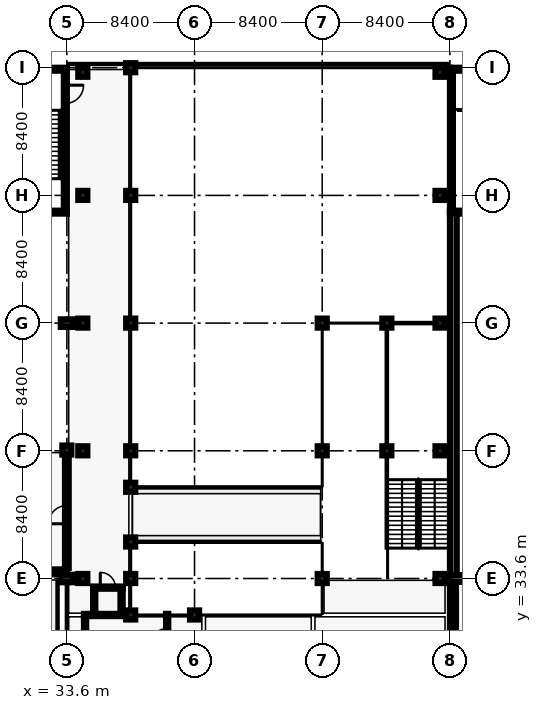
"""IFC4 building model, lengths in metres.
Left out: names, types, materials, properties, quantities, classifications, styles, units other than length and angle.
Written with IfcOpenShell. Run it as: python <this file> out.ifc"""

import sys

from ifc_helpers import new_model, si_unit, direction, frame, frame_2d, origin, origin_2d, place, context, subcontext, project, spatial, rectangle, extrude, element, fill, save


model = new_model("IFC4")
c1 = context("Model", 3, precision=1e-05, world=origin(), true_north=direction((0.0, 1.0)))
c2 = subcontext(c1, "Body", "Model", "MODEL_VIEW")
j1 = project(units=[si_unit("LENGTHUNIT", "METRE"), si_unit("PLANEANGLEUNIT", "RADIAN")], contexts=[c1])
p1 = place(None, origin())
s1 = spatial("IfcSite", under=j1, at=p1, CompositionType="ELEMENT")
p2 = place(p1, origin())
s2 = spatial("IfcBuilding", under=s1, at=p2, CompositionType="ELEMENT")
p3 = place(p2, frame((0.0, 0.0, 10.2)))
s3 = spatial("IfcBuildingStorey", under=s2, at=p3, CompositionType="ELEMENT", Elevation=10.2)
for number, where, z_axis, x_axis in (
    (1, (33.6, 57.7, 0.0), (0.0, 0.0, 1.0), (-1.0, 0.0, 0.0)),
    (2, (28.8, 67.1, 0.0), (0.0, 0.0, 1.0), (1.0, 0.0, 0.0)),
):
    element("IfcWall", number, at=place(p3, frame(where, z_axis=z_axis, x_axis=x_axis)), inside=s3, PredefinedType="SHEAR", context=c2, shape_type="SweptSolid", body=[
        extrude(rectangle(XDim=4.8, YDim=0.2, at=frame_2d((2.4, 0.0))), origin(), (0.0, 0.0, 1.0), 4.8),
    ])
p4 = place(p3, frame((33.5, 67.0, 0.0), z_axis=(0.0, 0.0, 1.0), x_axis=(0.0, -1.0, 0.0)))
e3 = element("IfcWall", 3, at=p4, inside=s3, PredefinedType="SHEAR", context=c2, shape_type="SweptSolid", body=[
    extrude(rectangle(XDim=9.2, YDim=0.2, at=frame_2d((4.6, 0.0))), origin(), (0.0, 0.0, 1.0), 4.8),
])
p5 = place(p4, frame((0.95, 0.0, 0.0)))
e4 = element("IfcOpeningElement", 4, at=p5, cuts=e3, PredefinedType="OPENING", context=c2, shape_type="SweptSolid", body=[
    extrude(rectangle(XDim=1.2, YDim=2.1, at=frame_2d((0.6, 1.05))), frame((0.0, 0.11, 0.0), z_axis=(0.0, -1.0, 0.0), x_axis=(1.0, 0.0, 0.0)), (0.0, 0.0, 1.0), 0.22),
])
for number, where, z_axis, x_axis in (
    (5, (63.6, 57.7, 0.0), (0.0, 0.0, 1.0), (-1.0, 0.0, 0.0)),
    (6, (58.8, 67.1, 0.0), (0.0, 0.0, 1.0), (1.0, 0.0, 0.0)),
):
    element("IfcWall", number, at=place(p3, frame(where, z_axis=z_axis, x_axis=x_axis)), inside=s3, PredefinedType="SHEAR", context=c2, shape_type="SweptSolid", body=[
        extrude(rectangle(XDim=4.8, YDim=0.2, at=frame_2d((2.4, 0.0))), origin(), (0.0, 0.0, 1.0), 4.8),
    ])
p6 = place(p3, frame((58.9, 57.8, 0.0), z_axis=(0.0, 0.0, 1.0), x_axis=(0.0, 1.0, 0.0)))
e7 = element("IfcWall", 7, at=p6, inside=s3, PredefinedType="SHEAR", context=c2, shape_type="SweptSolid", body=[
    extrude(rectangle(XDim=9.2, YDim=0.2, at=frame_2d((4.6, 0.0))), origin(), (0.0, 0.0, 1.0), 4.8),
])
p7 = place(p3, frame((62.4, 33.6, 0.0), z_axis=(0.0, 0.0, 1.0), x_axis=(-1.0, 0.0, 0.0)))
e8 = element("IfcWall", 8, at=p7, inside=s3, PredefinedType="SHEAR", context=c2, shape_type="SweptSolid", body=[
    extrude(rectangle(XDim=3.6, YDim=0.45, at=frame_2d((1.8, 0.0))), origin(), (0.0, 0.0, 1.0), 4.8),
])
p8 = place(p3, frame((59.025, 33.825, 0.0), z_axis=(0.0, 0.0, 1.0), x_axis=(0.0, 1.0, 0.0)))
e9 = element("IfcWall", 9, at=p8, inside=s3, PredefinedType="SHEAR", context=c2, shape_type="SweptSolid", body=[
    extrude(rectangle(XDim=23.775, YDim=0.45, at=frame_2d((11.888, 0.0))), origin(), (0.0, 0.0, 1.0), 4.8),
])
p9 = place(p3, frame((59.0, 25.2, 0.0), z_axis=(0.0, 0.0, 1.0), x_axis=(0.0, 1.0, 0.0)))
e10 = element("IfcWall", 10, at=p9, inside=s3, PredefinedType="SHEAR", context=c2, shape_type="SweptSolid", body=[
    extrude(rectangle(XDim=8.175, YDim=0.4, at=frame_2d((4.087, 0.0))), origin(), (0.0, 0.0, 1.0), 4.8),
])
for number, where, z_axis, x_axis in (
    (11, (33.6, 33.6, 0.0), (0.0, 0.0, 1.0), (1.0, 0.0, 0.0)),
    (12, (33.6, 50.4, 0.0), (0.0, 0.0, 1.0), (0.0, 1.0, 0.0)),
):
    element("IfcColumn", number, at=place(p3, frame(where, z_axis=z_axis, x_axis=x_axis)), inside=s3, PredefinedType="COLUMN", context=c2, shape_type="SweptSolid", body=[
        extrude(rectangle(XDim=0.8, YDim=0.5, at=origin_2d()), origin(), (0.0, 0.0, 1.0), 4.8),
    ])
for number, where, z_axis, x_axis in (
    (13, (50.4, 33.6, 0.0), (0.0, 0.0, 1.0), (1.0, 0.0, 0.0)),
    (14, (50.4, 42.0, 0.0), (0.0, 0.0, 1.0), (1.0, 0.0, 0.0)),
    (15, (50.4, 50.4, 0.0), (0.0, 0.0, 1.0), (1.0, 0.0, 0.0)),
    (16, (34.65, 33.6, 0.0), (0.0, 0.0, 1.0), (1.0, 0.0, 0.0)),
    (17, (34.65, 42.0, 0.0), (0.0, 0.0, 1.0), (1.0, 0.0, 0.0)),
    (18, (34.65, 50.4, 0.0), (0.0, 0.0, 1.0), (1.0, 0.0, 0.0)),
    (19, (34.65, 58.8, 0.0), (0.0, 0.0, 1.0), (1.0, 0.0, 0.0)),
    (20, (34.65, 66.9, 0.0), (0.0, 0.0, 1.0), (1.0, 0.0, 0.0)),
    (21, (58.15, 33.6, 0.0), (0.0, 0.0, 1.0), (1.0, 0.0, 0.0)),
    (22, (58.15, 42.0, 0.0), (0.0, 0.0, 1.0), (1.0, 0.0, 0.0)),
    (23, (58.15, 50.4, 0.0), (0.0, 0.0, 1.0), (1.0, 0.0, 0.0)),
    (24, (58.15, 58.8, 0.0), (0.0, 0.0, 1.0), (1.0, 0.0, 0.0)),
    (25, (58.15, 66.9, 0.0), (0.0, 0.0, 1.0), (1.0, 0.0, 0.0)),
):
    element("IfcColumn", number, at=place(p3, frame(where, z_axis=z_axis, x_axis=x_axis)), inside=s3, PredefinedType="COLUMN", context=c2, shape_type="SweptSolid", body=[
        extrude(rectangle(XDim=0.6, YDim=0.6, at=origin_2d()), origin(), (0.0, 0.0, 1.0), 4.8),
    ])
p10 = place(p3, frame((58.45, 67.1, 0.0), z_axis=(0.0, 0.0, 1.0), x_axis=(1.0, 0.0, 0.0)))
e26 = element("IfcWall", 26, at=p10, inside=s3, PredefinedType="SHEAR", context=c2, shape_type="SweptSolid", body=[
    extrude(rectangle(XDim=0.35, YDim=0.2, at=frame_2d((0.175, 0.0))), origin(), (0.0, 0.0, 1.0), 4.8),
])
p11 = place(p3, frame((58.625, 33.375, 0.0), z_axis=(0.0, 0.0, 1.0), x_axis=(0.0, 1.0, 0.0)))
e27 = element("IfcWall", 27, at=p11, inside=s3, PredefinedType="SHEAR", context=c2, shape_type="SweptSolid", body=[
    extrude(rectangle(XDim=0.45, YDim=0.35, at=frame_2d((0.225, 0.0))), origin(), (0.0, 0.0, 1.0), 4.8),
])
for number, where, z_axis, x_axis in (
    (28, (33.6, 42.05, 0.0), (0.0, 0.0, 1.0), (1.0, 0.0, 0.0)),
    (29, (37.8, 31.2, 0.0), (0.0, 0.0, 1.0), (1.0, 0.0, 0.0)),
    (30, (37.8, 67.2, 0.0), (0.0, 0.0, 1.0), (1.0, 0.0, 0.0)),
    (31, (37.801, 33.6, 0.0), (0.0, 0.0, 1.0), (1.0, 0.0, 0.0)),
    (32, (37.801, 42.0, 0.0), (0.0, 0.0, 1.0), (1.0, 0.0, 0.0)),
    (33, (37.801, 50.4, 0.0), (0.0, 0.0, 1.0), (1.0, 0.0, 0.0)),
    (34, (37.801, 58.8, 0.0), (0.0, 0.0, 1.0), (1.0, 0.0, 0.0)),
    (35, (42.0, 31.201, 0.0), (0.0, 0.0, 1.0), (1.0, 0.0, 0.0)),
    (36, (37.8, 36.0, 0.0), (0.0, 0.0, 1.0), (1.0, 0.0, 0.0)),
    (37, (37.8, 39.6, 0.0), (0.0, 0.0, 1.0), (1.0, 0.0, 0.0)),
    (38, (54.651, 42.0, 0.0), (0.0, 0.0, 1.0), (1.0, 0.0, 0.0)),
    (39, (54.651, 50.4, 0.0), (0.0, 0.0, 1.0), (1.0, 0.0, 0.0)),
):
    element("IfcColumn", number, at=place(p3, frame(where, z_axis=z_axis, x_axis=x_axis)), inside=s3, PredefinedType="COLUMN", context=c2, shape_type="SweptSolid", body=[
        extrude(rectangle(XDim=0.6, YDim=0.6, at=origin_2d()), origin(), (0.0, 0.0, 1.0), 4.8),
    ])
p12 = place(p3, frame((33.6, 34.05, 0.0), z_axis=(0.0, 0.0, 1.0), x_axis=(-1.0, 0.0, 0.0)))
e40 = element("IfcWall", 40, at=p12, inside=s3, PredefinedType="SOLIDWALL", context=c2, shape_type="SweptSolid", body=[
    extrude(rectangle(XDim=4.2, YDim=0.3, at=frame_2d((2.1, 0.0))), origin(), (0.0, 0.0, 1.0), 4.5),
])
p13 = place(p3, frame((33.6, 34.3, 0.0), z_axis=(0.0, 0.0, 1.0), x_axis=(0.0, 1.0, 0.0)))
e41 = element("IfcWall", 41, at=p13, inside=s3, PredefinedType="SOLIDWALL", context=c2, shape_type="SweptSolid", body=[
    extrude(rectangle(XDim=7.825, YDim=0.25, at=frame_2d((3.913, 0.0))), origin(), (0.0, 0.0, 1.0), 3.8),
])
p14 = place(p13, frame((2.9, 0.0, 0.0)))
e42 = element("IfcOpeningElement", 42, at=p14, cuts=e41, PredefinedType="OPENING", context=c2, shape_type="SweptSolid", body=[
    extrude(rectangle(XDim=1.2, YDim=2.1, at=frame_2d((0.6, 1.05))), frame((0.0, 0.135, 0.0), z_axis=(0.0, -1.0, 0.0), x_axis=(1.0, 0.0, 0.0)), (0.0, 0.0, 1.0), 0.27),
])
p15 = place(p3, frame((35.325, 33.0, 0.0), z_axis=(0.0, 0.0, 1.0), x_axis=(1.0, 0.0, 0.0)))
e43 = element("IfcWall", 43, at=p15, inside=s3, PredefinedType="PARTITIONING", context=c2, shape_type="SweptSolid", body=[
    extrude(rectangle(XDim=1.95, YDim=0.15, at=frame_2d((0.975, 0.0))), origin(), (0.0, 0.0, 1.0), 4.5),
])
p16 = place(p15, frame((0.475, 0.0, 0.0)))
e44 = element("IfcOpeningElement", 44, at=p16, cuts=e43, PredefinedType="OPENING", context=c2, shape_type="SweptSolid", body=[
    extrude(rectangle(XDim=1.0, YDim=2.1, at=frame_2d((0.5, 1.05))), frame((0.0, 0.085, 0.0), z_axis=(0.0, -1.0, 0.0), x_axis=(1.0, 0.0, 0.0)), (0.0, 0.0, 1.0), 0.17),
])
p17 = place(p3, frame((34.725, 31.2, 0.0), z_axis=(0.0, 0.0, 1.0), x_axis=(1.0, 0.0, 0.0)))
e45 = element("IfcWall", 45, at=p17, inside=s3, PredefinedType="SOLIDWALL", context=c2, shape_type="SweptSolid", body=[
    extrude(rectangle(XDim=3.15, YDim=0.15, at=frame_2d((1.575, 0.0))), origin(), (0.0, 0.0, 1.0), 4.0),
])
for number, where, z_axis, x_axis in (
    (46, (35.4, 31.275, 0.0), (0.0, 0.0, 1.0), (0.0, 1.0, 0.0)),
    (47, (37.2, 31.275, 0.0), (0.0, 0.0, 1.0), (0.0, 1.0, 0.0)),
):
    element("IfcWall", number, at=place(p3, frame(where, z_axis=z_axis, x_axis=x_axis)), inside=s3, PredefinedType="PARTITIONING", context=c2, shape_type="SweptSolid", body=[
        extrude(rectangle(XDim=1.65, YDim=0.15, at=frame_2d((0.825, 0.0))), origin(), (0.0, 0.0, 1.0), 4.5),
    ])
p18 = place(p3, frame((34.8, 28.275, 0.0), z_axis=(0.0, 0.0, 1.0), x_axis=(0.0, 1.0, 0.0)))
e48 = element("IfcWall", 48, at=p18, inside=s3, PredefinedType="SOLIDWALL", context=c2, shape_type="SweptSolid", body=[
    extrude(rectangle(XDim=2.85, YDim=0.15, at=frame_2d((1.425, 0.0))), origin(), (0.0, 0.0, 1.0), 4.5),
])
p19 = place(p3, frame((40.2, 28.125, 0.0), z_axis=(0.0, 0.0, 1.0), x_axis=(0.0, 1.0, 0.0)))
e49 = element("IfcWall", 49, at=p19, inside=s3, PredefinedType="SOLIDWALL", context=c2, shape_type="SweptSolid", body=[
    extrude(rectangle(XDim=3.15, YDim=0.15, at=frame_2d((1.575, 0.0))), origin(), (0.0, 0.0, 1.0), 4.0),
])
p20 = place(p19, frame((0.975, 0.0, 0.0)))
e50 = element("IfcOpeningElement", 50, at=p20, cuts=e49, PredefinedType="OPENING", context=c2, shape_type="SweptSolid", body=[
    extrude(rectangle(XDim=1.2, YDim=2.1, at=frame_2d((0.6, 1.05))), frame((0.0, 0.085, 0.0), z_axis=(0.0, -1.0, 0.0), x_axis=(1.0, 0.0, 0.0)), (0.0, 0.0, 1.0), 0.17),
])
p21 = place(p5, origin())
e51 = element("IfcDoor", 51, at=p21, inside=s3, OperationType="SINGLE_SWING_RIGHT", PredefinedType="DOOR", context=c2, shape_type="SweptSolid", body=[
    extrude(rectangle(XDim=1.2, YDim=2.1, at=frame_2d((0.6, 1.05))), frame((0.0, 0.025, 0.0), z_axis=(0.0, -1.0, 0.0), x_axis=(1.0, 0.0, 0.0)), (0.0, 0.0, 1.0), 0.05),
])
fill(e4, e51)
p22 = place(p16, origin())
e52 = element("IfcDoor", 52, at=p22, inside=s3, OperationType="SINGLE_SWING_LEFT", PredefinedType="DOOR", context=c2, shape_type="SweptSolid", body=[
    extrude(rectangle(XDim=1.0, YDim=2.1, at=frame_2d((0.5, 1.05))), frame((0.0, 0.025, 0.0), z_axis=(0.0, -1.0, 0.0), x_axis=(1.0, 0.0, 0.0)), (0.0, 0.0, 1.0), 0.05),
])
fill(e44, e52)
p23 = place(p14, origin())
e53 = element("IfcDoor", 53, at=p23, inside=s3, OperationType="SINGLE_SWING_LEFT", PredefinedType="DOOR", context=c2, shape_type="SweptSolid", body=[
    extrude(rectangle(XDim=1.2, YDim=2.1, at=frame_2d((0.6, 1.05))), frame((0.0, 0.025, 0.0), z_axis=(0.0, -1.0, 0.0), x_axis=(1.0, 0.0, 0.0)), (0.0, 0.0, 1.0), 0.05),
])
fill(e42, e53)
p24 = place(p20, origin())
e54 = element("IfcDoor", 54, at=p24, inside=s3, OperationType="SINGLE_SWING_RIGHT", PredefinedType="DOOR", context=c2, shape_type="SweptSolid", body=[
    extrude(rectangle(XDim=1.2, YDim=2.1, at=frame_2d((0.6, 1.05))), frame((0.0, 0.025, 0.0), z_axis=(0.0, -1.0, 0.0), x_axis=(1.0, 0.0, 0.0)), (0.0, 0.0, 1.0), 0.05),
])
fill(e50, e54)
save(model, sys.argv[1])
